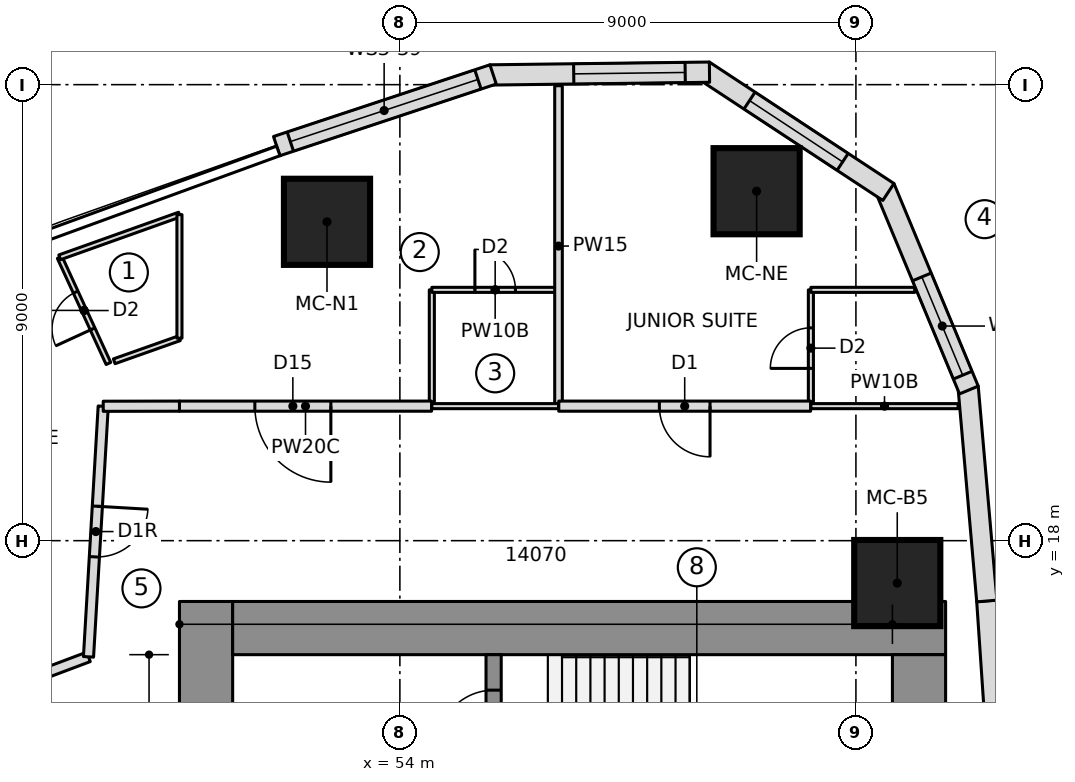
"""IFC4 building model, lengths in metres.
Left out: names, types, materials, properties, quantities, classifications, styles, units other than length and angle.
Written with IfcOpenShell. Run it as: python <this file> out.ifc"""

import sys

from ifc_helpers import new_model, si_unit, direction, frame, frame_2d, origin, origin_2d, place, context, subcontext, project, spatial, polyline, rectangle, outline, extrude, element, fill, save


model = new_model("IFC4")
c1 = context("Model", 3, precision=1e-05, world=origin(), true_north=direction((0.0, 1.0)))
c2 = subcontext(c1, "Body", "Model", "MODEL_VIEW")
j1 = project(units=[si_unit("LENGTHUNIT", "METRE"), si_unit("PLANEANGLEUNIT", "RADIAN")], contexts=[c1])
p1 = place(None, origin())
s1 = spatial("IfcSite", under=j1, at=p1, CompositionType="ELEMENT")
p2 = place(p1, origin())
s2 = spatial("IfcBuilding", under=s1, at=p2, CompositionType="ELEMENT")
p3 = place(p2, frame((0.0, 0.0, 95.55)))
s3 = spatial("IfcBuildingStorey", under=s2, at=p3, CompositionType="ELEMENT", Elevation=95.55)
p4 = place(p3, frame((50.175, 6.65, 0.0), z_axis=(0.0, 0.0, 1.0), x_axis=(0.0, 1.0, 0.0)))
e1 = element("IfcWall", 1, at=p4, inside=s3, PredefinedType="SHEAR", context=c2, shape_type="SweptSolid", body=[
    extrude(rectangle(XDim=10.15, YDim=1.05, at=frame_2d((5.075, 0.0))), origin(), (0.0, 0.0, 1.0), 3.55),
])
p5 = place(p4, frame((6.5, 0.0, 0.0)))
e2 = element("IfcOpeningElement", 2, at=p5, cuts=e1, PredefinedType="OPENING", context=c2, shape_type="SweptSolid", body=[
    extrude(rectangle(XDim=1.1, YDim=2.1, at=frame_2d((0.55, 1.05))), frame((0.0, 0.535, 0.0), z_axis=(0.0, -1.0, 0.0), x_axis=(1.0, 0.0, 0.0)), (0.0, 0.0, 1.0), 1.07),
])
p6 = place(p3, frame((50.7, 16.275, 0.0), z_axis=(0.0, 0.0, 1.0), x_axis=(1.0, 0.0, 0.0)))
e3 = element("IfcWall", 3, at=p6, inside=s3, PredefinedType="SHEAR", context=c2, shape_type="SweptSolid", body=[
    extrude(rectangle(XDim=14.07, YDim=1.05, at=frame_2d((7.035, 0.0))), origin(), (0.0, 0.0, 1.0), 3.55),
])
p7 = place(p3, frame((64.245, 9.389, 0.0), z_axis=(0.0, 0.0, 1.0), x_axis=(0.0, 1.0, 0.0)))
e4 = element("IfcWall", 4, at=p7, inside=s3, PredefinedType="SHEAR", context=c2, shape_type="SweptSolid", body=[
    extrude(rectangle(XDim=6.361, YDim=1.05, at=frame_2d((3.181, 0.0))), origin(), (0.0, 0.0, 1.0), 3.55),
])
p8 = place(p3, frame((55.85, 10.35, 0.0), z_axis=(0.0, 0.0, 1.0), x_axis=(0.0, 1.0, 0.0)))
e5 = element("IfcWall", 5, at=p8, inside=s3, PredefinedType="SHEAR", context=c2, shape_type="SweptSolid", body=[
    extrude(rectangle(XDim=5.4, YDim=0.3, at=frame_2d((2.7, 0.0))), origin(), (0.0, 0.0, 1.0), 3.55),
])
p9 = place(p8, frame((1.43, 0.0, 0.0)))
e6 = element("IfcOpeningElement", 6, at=p9, cuts=e5, PredefinedType="OPENING", context=c2, shape_type="SweptSolid", body=[
    extrude(rectangle(XDim=1.1, YDim=2.1, at=frame_2d((0.55, 1.05))), frame((0.0, 0.16, 0.0), z_axis=(0.0, -1.0, 0.0), x_axis=(1.0, 0.0, 0.0)), (0.0, 0.0, 1.0), 0.32),
])
p10 = place(p8, frame((3.6, 0.0, 0.0)))
e7 = element("IfcOpeningElement", 7, at=p10, cuts=e5, PredefinedType="OPENING", context=c2, shape_type="SweptSolid", body=[
    extrude(rectangle(XDim=1.1, YDim=2.1, at=frame_2d((0.55, 1.05))), frame((0.0, 0.16, 0.0), z_axis=(0.0, -1.0, 0.0), x_axis=(1.0, 0.0, 0.0)), (0.0, 0.0, 1.0), 0.32),
])
for number, where, z_axis, x_axis in (
    (8, (63.816, 17.164, 0.0), (0.0, 0.0, 1.0), (1.0, 0.0, 0.0)),
    (9, (61.04, 24.897, 0.0), (0.0, 0.0, 1.0), (1.0, 0.0, 0.0)),
    (10, (52.562, 24.293, 0.0), (0.0, 0.0, 1.0), (1.0, 0.0, 0.0)),
):
    element("IfcColumn", number, at=place(p3, frame(where, z_axis=z_axis, x_axis=x_axis)), inside=s3, PredefinedType="COLUMN", context=c2, shape_type="SweptSolid", body=[
        extrude(rectangle(XDim=1.7, YDim=1.7, at=origin_2d()), origin(), (0.0, 0.0, 1.0), 3.55),
    ])
p11 = place(p3, frame((65.868, 12.614, 0.0), z_axis=(0.0, 0.0, 1.0), x_axis=(-0.067724559895, 0.997704056315, 0.0)))
e11 = element("IfcWall", 11, at=p11, inside=s3, PredefinedType="NOTDEFINED", context=c2, shape_type="SweptSolid", body=[
    extrude(outline(polyline([(-0.002, -0.2), (4.209, -0.2), (4.205, 0.2), (0.002, 0.2), (-0.002, -0.2)])), origin(), (0.0, 0.0, 1.0), 3.25),
])
p12 = place(p3, frame((65.583, 16.811, 0.0), z_axis=(0.0, 0.0, 1.0), x_axis=(-0.086992730434, 0.996208946382, 0.0)))
e12 = element("IfcWall", 12, at=p12, inside=s3, PredefinedType="NOTDEFINED", context=c2, shape_type="SweptSolid", body=[
    extrude(outline(polyline([(-0.002, -0.2), (4.238, -0.2), (4.176, 0.2), (0.002, 0.2), (-0.002, -0.2)])), origin(), (0.0, 0.0, 1.0), 3.25),
])
p13 = place(p3, frame((65.217, 21.002, 0.0), z_axis=(0.0, 0.0, 1.0), x_axis=(-0.383997751971, 0.923334027577, 0.0)))
e13 = element("IfcWall", 13, at=p13, inside=s3, PredefinedType="NOTDEFINED", context=c2, shape_type="SweptSolid", body=[
    extrude(outline(polyline([(-0.031, -0.2), (4.3, -0.2), (4.177, 0.2), (0.031, 0.2), (-0.031, -0.2)])), origin(), (0.0, 0.0, 1.0), 3.25),
])
p14 = place(p13, frame((0.287, 0.0, 0.6)))
e14 = element("IfcOpeningElement", 14, at=p14, cuts=e13, PredefinedType="OPENING", context=c2, shape_type="SweptSolid", body=[
    extrude(outline(polyline([(0.0, 1.4), (0.08, 1.802), (0.308, 2.142), (0.648, 2.37), (1.05, 2.45), (1.452, 2.37), (1.792, 2.142), (2.02, 1.802), (2.1, 1.4), (2.1, 1.05), (2.02, 0.648), (1.792, 0.308), (1.452, 0.08), (1.05, 0.0), (0.648, 0.08), (0.308, 0.308), (0.08, 0.648), (0.0, 1.05), (0.0, 1.4)])), frame((0.0, 0.21, 0.0), z_axis=(0.0, -1.0, 0.0), x_axis=(1.0, 0.0, 0.0)), (0.0, 0.0, 1.0), 0.42),
])
p15 = place(p3, frame((63.59, 24.916, 0.0), z_axis=(0.0, 0.0, 1.0), x_axis=(-0.835340523653, 0.549732852887, 0.0)))
e15 = element("IfcWall", 15, at=p15, inside=s3, PredefinedType="NOTDEFINED", context=c2, shape_type="SweptSolid", body=[
    extrude(outline(polyline([(-0.061, -0.2), (4.3, -0.2), (4.178, 0.2), (0.061, 0.2), (-0.061, -0.2)])), origin(), (0.0, 0.0, 1.0), 3.25),
])
p16 = place(p15, frame((1.02, 0.0, 0.6)))
e16 = element("IfcOpeningElement", 16, at=p16, cuts=e15, PredefinedType="OPENING", context=c2, shape_type="SweptSolid", body=[
    extrude(outline(polyline([(0.0, 1.35), (0.084, 1.771), (0.322, 2.128), (0.679, 2.366), (1.1, 2.45), (1.521, 2.366), (1.878, 2.128), (2.116, 1.771), (2.2, 1.35), (2.2, 1.1), (2.116, 0.679), (1.878, 0.322), (1.521, 0.084), (1.1, 0.0), (0.679, 0.084), (0.322, 0.322), (0.084, 0.679), (0.0, 1.1), (0.0, 1.35)])), frame((0.0, 0.21, 0.0), z_axis=(0.0, -1.0, 0.0), x_axis=(1.0, 0.0, 0.0)), (0.0, 0.0, 1.0), 0.42),
])
p17 = place(p3, frame((60.049, 27.246, 0.0), z_axis=(0.0, 0.0, 1.0), x_axis=(-0.999919718849, -0.012671063772, 0.0)))
e17 = element("IfcWall", 17, at=p17, inside=s3, PredefinedType="NOTDEFINED", context=c2, shape_type="SweptSolid", body=[
    extrude(outline(polyline([(-0.061, -0.2), (4.27, -0.2), (4.208, 0.2), (0.061, 0.2), (-0.061, -0.2)])), origin(), (0.0, 0.0, 1.0), 3.25),
])
p18 = place(p17, frame((0.418, 0.0, 0.6)))
e18 = element("IfcOpeningElement", 18, at=p18, cuts=e17, PredefinedType="OPENING", context=c2, shape_type="SweptSolid", body=[
    extrude(outline(polyline([(0.0, 1.35), (0.084, 1.771), (0.322, 2.128), (0.679, 2.366), (1.1, 2.45), (1.521, 2.366), (1.878, 2.128), (2.116, 1.771), (2.2, 1.35), (2.2, 1.1), (2.116, 0.679), (1.878, 0.322), (1.521, 0.084), (1.1, 0.0), (0.679, 0.084), (0.322, 0.322), (0.084, 0.679), (0.0, 1.1), (0.0, 1.35)])), frame((0.0, 0.21, 0.0), z_axis=(0.0, -1.0, 0.0), x_axis=(1.0, 0.0, 0.0)), (0.0, 0.0, 1.0), 0.42),
])
p19 = place(p3, frame((55.81, 27.192, 0.0), z_axis=(0.0, 0.0, 1.0), x_axis=(-0.94925004851, -0.314522408429, 0.0)))
e19 = element("IfcWall", 19, at=p19, inside=s3, PredefinedType="NOTDEFINED", context=c2, shape_type="SweptSolid", body=[
    extrude(outline(polyline([(-0.031, -0.2), (4.468, -0.2), (4.468, 0.2), (0.031, 0.2), (-0.031, -0.2)])), origin(), (0.0, 0.0, 1.0), 3.25),
])
p20 = place(p19, frame((0.284, 0.0, 0.9)))
e20 = element("IfcOpeningElement", 20, at=p20, cuts=e19, PredefinedType="OPENING", context=c2, shape_type="SweptSolid", body=[
    extrude(rectangle(XDim=3.9, YDim=1.8, at=frame_2d((1.95, 0.9))), frame((0.0, 0.21, 0.0), z_axis=(0.0, -1.0, 0.0), x_axis=(1.0, 0.0, 0.0)), (0.0, 0.0, 1.0), 0.42),
])
p21 = place(p3, frame((54.631, 20.65, 0.0), z_axis=(0.0, 0.0, 1.0), x_axis=(0.0, 1.0, 0.0)))
e21 = element("IfcWall", 21, at=p21, inside=s3, PredefinedType="PARTITIONING", context=c2, shape_type="SweptSolid", body=[
    extrude(rectangle(XDim=2.3, YDim=0.1, at=frame_2d((1.15, 0.0))), origin(), (0.0, 0.0, 1.0), 3.25),
])
p22 = place(p3, frame((54.631, 22.95, 0.0), z_axis=(0.0, 0.0, 1.0), x_axis=(1.0, 0.0, 0.0)))
e22 = element("IfcWall", 22, at=p22, inside=s3, PredefinedType="PARTITIONING", context=c2, shape_type="SweptSolid", body=[
    extrude(rectangle(XDim=2.5, YDim=0.1, at=frame_2d((1.25, 0.0))), origin(), (0.0, 0.0, 1.0), 3.25),
])
p23 = place(p22, frame((0.85, 0.0, 0.0)))
e23 = element("IfcOpeningElement", 23, at=p23, cuts=e22, PredefinedType="OPENING", context=c2, shape_type="SweptSolid", body=[
    extrude(rectangle(XDim=0.8, YDim=2.1, at=frame_2d((0.4, 1.05))), frame((0.0, 0.06, 0.0), z_axis=(0.0, -1.0, 0.0), x_axis=(1.0, 0.0, 0.0)), (0.0, 0.0, 1.0), 0.12),
])
p24 = place(p3, frame((62.111, 20.65, 0.0), z_axis=(0.0, 0.0, 1.0), x_axis=(0.0, 1.0, 0.0)))
e24 = element("IfcWall", 24, at=p24, inside=s3, PredefinedType="PARTITIONING", context=c2, shape_type="SweptSolid", body=[
    extrude(rectangle(XDim=2.3, YDim=0.1, at=frame_2d((1.15, 0.0))), origin(), (0.0, 0.0, 1.0), 3.25),
])
p25 = place(p24, frame((0.75, 0.0, 0.0)))
e25 = element("IfcOpeningElement", 25, at=p25, cuts=e24, PredefinedType="OPENING", context=c2, shape_type="SweptSolid", body=[
    extrude(rectangle(XDim=0.8, YDim=2.1, at=frame_2d((0.4, 1.05))), frame((0.0, 0.06, 0.0), z_axis=(0.0, -1.0, 0.0), x_axis=(1.0, 0.0, 0.0)), (0.0, 0.0, 1.0), 0.12),
])
p26 = place(p3, frame((62.111, 22.95, 0.0), z_axis=(0.0, 0.0, 1.0), x_axis=(1.0, 0.0, 0.0)))
e26 = element("IfcWall", 26, at=p26, inside=s3, PredefinedType="PARTITIONING", context=c2, shape_type="SweptSolid", body=[
    extrude(rectangle(XDim=2.049, YDim=0.1, at=frame_2d((1.025, 0.0))), origin(), (0.0, 0.0, 1.0), 3.25),
])
p27 = place(p3, frame((57.131, 20.65, 0.0), z_axis=(0.0, 0.0, 1.0), x_axis=(0.0, 1.0, 0.0)))
e27 = element("IfcWall", 27, at=p27, inside=s3, PredefinedType="PARTITIONING", context=c2, shape_type="SweptSolid", body=[
    extrude(rectangle(XDim=6.329, YDim=0.15, at=frame_2d((3.165, 0.0))), origin(), (0.0, 0.0, 1.0), 3.25),
])
p28 = place(p3, frame((49.65, 21.996, 0.0), z_axis=(0.0, 0.0, 1.0), x_axis=(-0.942692856107, -0.333661773425, 0.0)))
e28 = element("IfcWall", 28, at=p28, inside=s3, PredefinedType="PARTITIONING", context=c2, shape_type="SweptSolid", body=[
    extrude(rectangle(XDim=1.365, YDim=0.1, at=frame_2d((0.683, 0.0))), origin(), (0.0, 0.0, 1.0), 3.25),
])
p29 = place(p3, frame((48.249, 21.497, 0.0), z_axis=(0.0, 0.0, 1.0), x_axis=(-0.41749308293, 0.908680100864, 0.0)))
e29 = element("IfcWall", 29, at=p29, inside=s3, PredefinedType="PARTITIONING", context=c2, shape_type="SweptSolid", body=[
    extrude(rectangle(XDim=2.306, YDim=0.1, at=frame_2d((1.153, 0.0))), origin(), (0.0, 0.0, 1.0), 3.25),
])
p30 = place(p29, frame((0.75, 0.0, 0.0)))
e30 = element("IfcOpeningElement", 30, at=p30, cuts=e29, PredefinedType="OPENING", context=c2, shape_type="SweptSolid", body=[
    extrude(rectangle(XDim=0.8, YDim=2.1, at=frame_2d((0.4, 1.05))), frame((0.0, 0.06, 0.0), z_axis=(0.0, -1.0, 0.0), x_axis=(1.0, 0.0, 0.0)), (0.0, 0.0, 1.0), 0.12),
])
p31 = place(p3, frame((54.625, 20.655, 0.0), z_axis=(0.0, 0.0, 1.0), x_axis=(-1.0, 0.0, 0.0)))
e31 = element("IfcWall", 31, at=p31, inside=s3, PredefinedType="PARTITIONING", context=c2, shape_type="SweptSolid", body=[
    extrude(rectangle(XDim=4.976, YDim=0.2, at=frame_2d((2.488, 0.0))), origin(), (0.0, 0.0, 1.0), 3.25),
])
p32 = place(p31, frame((1.988, 0.0, 0.0)))
e32 = element("IfcOpeningElement", 32, at=p32, cuts=e31, PredefinedType="OPENING", context=c2, shape_type="SweptSolid", body=[
    extrude(rectangle(XDim=1.5, YDim=2.1, at=frame_2d((0.75, 1.05))), frame((0.0, 0.11, 0.0), z_axis=(0.0, -1.0, 0.0), x_axis=(1.0, 0.0, 0.0)), (0.0, 0.0, 1.0), 0.22),
])
p33 = place(p3, frame((62.106, 20.655, 0.0), z_axis=(0.0, 0.0, 1.0), x_axis=(-1.0, 0.0, 0.0)))
e33 = element("IfcWall", 33, at=p33, inside=s3, PredefinedType="PARTITIONING", context=c2, shape_type="SweptSolid", body=[
    extrude(rectangle(XDim=4.971, YDim=0.2, at=frame_2d((2.485, 0.0))), origin(), (0.0, 0.0, 1.0), 3.25),
])
p34 = place(p33, frame((1.985, 0.0, 0.0)))
e34 = element("IfcOpeningElement", 34, at=p34, cuts=e33, PredefinedType="OPENING", context=c2, shape_type="SweptSolid", body=[
    extrude(rectangle(XDim=1.0, YDim=2.1, at=frame_2d((0.5, 1.05))), frame((0.0, 0.11, 0.0), z_axis=(0.0, -1.0, 0.0), x_axis=(1.0, 0.0, 0.0)), (0.0, 0.0, 1.0), 0.22),
])
p35 = place(p3, frame((57.131, 20.655, 0.0), z_axis=(0.0, 0.0, 1.0), x_axis=(-1.0, 0.0, 0.0)))
e35 = element("IfcWall", 35, at=p35, inside=s3, PredefinedType="PARTITIONING", context=c2, shape_type="SweptSolid", body=[
    extrude(rectangle(XDim=2.5, YDim=0.1, at=frame_2d((1.25, 0.0))), origin(), (0.0, 0.0, 1.0), 3.25),
])
p36 = place(p3, frame((65.017, 20.655, 0.0), z_axis=(0.0, 0.0, 1.0), x_axis=(-1.0, 0.0, 0.0)))
e36 = element("IfcWall", 36, at=p36, inside=s3, PredefinedType="PARTITIONING", context=c2, shape_type="SweptSolid", body=[
    extrude(rectangle(XDim=2.906, YDim=0.1, at=frame_2d((1.453, 0.0))), origin(), (0.0, 0.0, 1.0), 3.25),
])
p37 = place(p3, frame((47.286, 23.592, 0.0), z_axis=(0.0, 0.0, 1.0), x_axis=(0.941933231826, 0.335800218555, 0.0)))
e37 = element("IfcWall", 37, at=p37, inside=s3, PredefinedType="PARTITIONING", context=c2, shape_type="SweptSolid", body=[
    extrude(rectangle(XDim=2.51, YDim=0.1, at=frame_2d((1.255, 0.0))), origin(), (0.0, 0.0, 1.0), 3.25),
])
p38 = place(p3, frame((49.65, 24.435, 0.0), z_axis=(0.0, 0.0, 1.0), x_axis=(0.0, -1.0, 0.0)))
e38 = element("IfcWall", 38, at=p38, inside=s3, PredefinedType="PARTITIONING", context=c2, shape_type="SweptSolid", body=[
    extrude(rectangle(XDim=2.439, YDim=0.1, at=frame_2d((1.22, 0.0))), origin(), (0.0, 0.0, 1.0), 3.25),
])
p39 = place(p3, frame((47.855, 15.707, 0.0), z_axis=(0.0, 0.0, 1.0), x_axis=(-0.935803526171, -0.35252199989, 0.0)))
e39 = element("IfcWall", 39, at=p39, inside=s3, PredefinedType="PARTITIONING", context=c2, shape_type="SweptSolid", body=[
    extrude(rectangle(XDim=0.995, YDim=0.2, at=frame_2d((0.497, 0.0))), origin(), (0.0, 0.0, 1.0), 3.25),
])
p40 = place(p3, frame((48.146, 20.652, 0.0), z_axis=(0.0, 0.0, 1.0), x_axis=(-0.058649792989, -0.998278619315, 0.0)))
e40 = element("IfcWall", 40, at=p40, inside=s3, PredefinedType="PARTITIONING", context=c2, shape_type="SweptSolid", body=[
    extrude(rectangle(XDim=4.954, YDim=0.2, at=frame_2d((2.477, 0.0))), origin(), (0.0, 0.0, 1.0), 3.25),
])
p41 = place(p40, frame((1.977, 0.0, 0.0)))
e41 = element("IfcOpeningElement", 41, at=p41, cuts=e40, PredefinedType="OPENING", context=c2, shape_type="SweptSolid", body=[
    extrude(rectangle(XDim=1.0, YDim=2.1, at=frame_2d((0.5, 1.05))), frame((0.0, 0.11, 0.0), z_axis=(0.0, -1.0, 0.0), x_axis=(1.0, 0.0, 0.0)), (0.0, 0.0, 1.0), 0.22),
])
p42 = place(p3, frame((49.65, 20.655, 0.0), z_axis=(0.0, 0.0, 1.0), x_axis=(-0.999998406651, -0.001785131852, 0.0)))
e42 = element("IfcWall", 42, at=p42, inside=s3, PredefinedType="PARTITIONING", context=c2, shape_type="SweptSolid", body=[
    extrude(rectangle(XDim=1.504, YDim=0.2, at=frame_2d((0.752, 0.0))), origin(), (0.0, 0.0, 1.0), 3.25),
])
p43 = place(p14, origin())
e43 = element("IfcWindow", 43, at=p43, inside=s3, PartitioningType="SINGLE_PANEL", PredefinedType="WINDOW", context=c2, shape_type="SweptSolid", body=[
    extrude(outline(polyline([(0.0, 1.4), (0.08, 1.802), (0.308, 2.142), (0.648, 2.37), (1.05, 2.45), (1.452, 2.37), (1.792, 2.142), (2.02, 1.802), (2.1, 1.4), (2.1, 1.05), (2.02, 0.648), (1.792, 0.308), (1.452, 0.08), (1.05, 0.0), (0.648, 0.08), (0.308, 0.308), (0.08, 0.648), (0.0, 1.05), (0.0, 1.4)])), frame((0.0, 0.17, 0.0), z_axis=(0.0, -1.0, 0.0), x_axis=(1.0, 0.0, 0.0)), (0.0, 0.0, 1.0), 0.06),
])
fill(e14, e43)
p44 = place(p16, origin())
e44 = element("IfcWindow", 44, at=p44, inside=s3, PartitioningType="SINGLE_PANEL", PredefinedType="WINDOW", context=c2, shape_type="SweptSolid", body=[
    extrude(outline(polyline([(0.0, 1.35), (0.084, 1.771), (0.322, 2.128), (0.679, 2.366), (1.1, 2.45), (1.521, 2.366), (1.878, 2.128), (2.116, 1.771), (2.2, 1.35), (2.2, 1.1), (2.116, 0.679), (1.878, 0.322), (1.521, 0.084), (1.1, 0.0), (0.679, 0.084), (0.322, 0.322), (0.084, 0.679), (0.0, 1.1), (0.0, 1.35)])), frame((0.0, 0.17, 0.0), z_axis=(0.0, -1.0, 0.0), x_axis=(1.0, 0.0, 0.0)), (0.0, 0.0, 1.0), 0.06),
])
fill(e16, e44)
p45 = place(p18, origin())
e45 = element("IfcWindow", 45, at=p45, inside=s3, PartitioningType="SINGLE_PANEL", PredefinedType="WINDOW", context=c2, shape_type="SweptSolid", body=[
    extrude(outline(polyline([(0.0, 1.35), (0.084, 1.771), (0.322, 2.128), (0.679, 2.366), (1.1, 2.45), (1.521, 2.366), (1.878, 2.128), (2.116, 1.771), (2.2, 1.35), (2.2, 1.1), (2.116, 0.679), (1.878, 0.322), (1.521, 0.084), (1.1, 0.0), (0.679, 0.084), (0.322, 0.322), (0.084, 0.679), (0.0, 1.1), (0.0, 1.35)])), frame((0.0, 0.17, 0.0), z_axis=(0.0, -1.0, 0.0), x_axis=(1.0, 0.0, 0.0)), (0.0, 0.0, 1.0), 0.06),
])
fill(e18, e45)
p46 = place(p20, origin())
e46 = element("IfcWindow", 46, at=p46, inside=s3, PartitioningType="SINGLE_PANEL", PredefinedType="WINDOW", context=c2, shape_type="SweptSolid", body=[
    extrude(rectangle(XDim=3.9, YDim=1.8, at=frame_2d((1.95, 0.9))), frame((0.0, 0.17, 0.0), z_axis=(0.0, -1.0, 0.0), x_axis=(1.0, 0.0, 0.0)), (0.0, 0.0, 1.0), 0.06),
])
fill(e20, e46)
p47 = place(p23, origin())
e47 = element("IfcDoor", 47, at=p47, inside=s3, OperationType="SINGLE_SWING_LEFT", PredefinedType="DOOR", context=c2, shape_type="SweptSolid", body=[
    extrude(rectangle(XDim=0.8, YDim=2.1, at=frame_2d((0.4, 1.05))), frame((0.0, 0.025, 0.0), z_axis=(0.0, -1.0, 0.0), x_axis=(1.0, 0.0, 0.0)), (0.0, 0.0, 1.0), 0.05),
])
fill(e23, e47)
p48 = place(p25, origin())
e48 = element("IfcDoor", 48, at=p48, inside=s3, OperationType="SINGLE_SWING_LEFT", PredefinedType="DOOR", context=c2, shape_type="SweptSolid", body=[
    extrude(rectangle(XDim=0.8, YDim=2.1, at=frame_2d((0.4, 1.05))), frame((0.0, 0.025, 0.0), z_axis=(0.0, -1.0, 0.0), x_axis=(1.0, 0.0, 0.0)), (0.0, 0.0, 1.0), 0.05),
])
fill(e25, e48)
p49 = place(p30, origin())
e49 = element("IfcDoor", 49, at=p49, inside=s3, OperationType="SINGLE_SWING_LEFT", PredefinedType="DOOR", context=c2, shape_type="SweptSolid", body=[
    extrude(rectangle(XDim=0.8, YDim=2.1, at=frame_2d((0.4, 1.05))), frame((0.0, 0.025, 0.0), z_axis=(0.0, -1.0, 0.0), x_axis=(1.0, 0.0, 0.0)), (0.0, 0.0, 1.0), 0.05),
])
fill(e30, e49)
p50 = place(p32, origin())
e50 = element("IfcDoor", 50, at=p50, inside=s3, OperationType="DOUBLE_DOOR_SINGLE_SWING", PredefinedType="DOOR", context=c2, shape_type="SweptSolid", body=[
    extrude(rectangle(XDim=1.5, YDim=2.1, at=frame_2d((0.75, 1.05))), frame((0.0, 0.025, 0.0), z_axis=(0.0, -1.0, 0.0), x_axis=(1.0, 0.0, 0.0)), (0.0, 0.0, 1.0), 0.05),
])
fill(e32, e50)
p51 = place(p34, origin())
e51 = element("IfcDoor", 51, at=p51, inside=s3, OperationType="SINGLE_SWING_LEFT", PredefinedType="DOOR", context=c2, shape_type="SweptSolid", body=[
    extrude(rectangle(XDim=1.0, YDim=2.1, at=frame_2d((0.5, 1.05))), frame((0.0, 0.025, 0.0), z_axis=(0.0, -1.0, 0.0), x_axis=(1.0, 0.0, 0.0)), (0.0, 0.0, 1.0), 0.05),
])
fill(e34, e51)
p52 = place(p41, origin())
e52 = element("IfcDoor", 52, at=p52, inside=s3, OperationType="SINGLE_SWING_RIGHT", PredefinedType="DOOR", context=c2, shape_type="SweptSolid", body=[
    extrude(rectangle(XDim=1.0, YDim=2.1, at=frame_2d((0.5, 1.05))), frame((0.0, 0.025, 0.0), z_axis=(0.0, -1.0, 0.0), x_axis=(1.0, 0.0, 0.0)), (0.0, 0.0, 1.0), 0.05),
])
fill(e41, e52)
p53 = place(p10, origin())
e53 = element("IfcDoor", 53, at=p53, inside=s3, OperationType="SINGLE_SWING_RIGHT", PredefinedType="DOOR", context=c2, shape_type="SweptSolid", body=[
    extrude(rectangle(XDim=1.1, YDim=2.1, at=frame_2d((0.55, 1.05))), frame((0.0, 0.025, 0.0), z_axis=(0.0, -1.0, 0.0), x_axis=(1.0, 0.0, 0.0)), (0.0, 0.0, 1.0), 0.05),
])
fill(e7, e53)
save(model, sys.argv[1])
